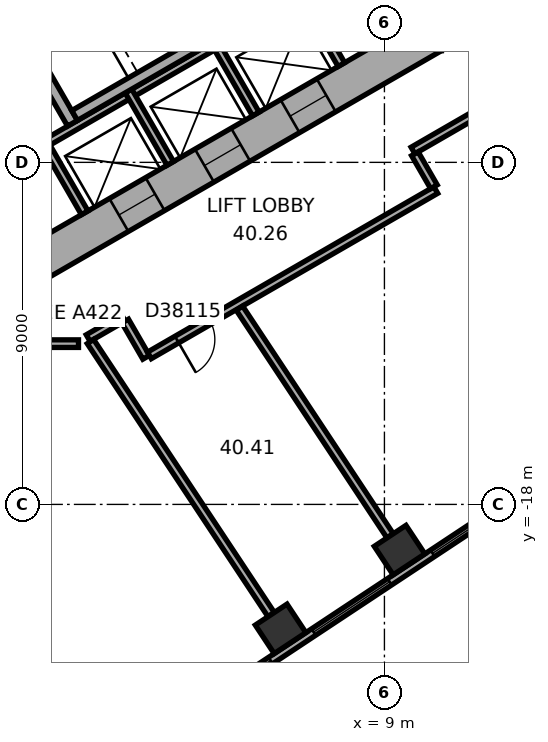
"""IFC4 building model, lengths in metres.
Left out: names, types, materials, properties, quantities, classifications, styles, units other than length and angle.
Written with IfcOpenShell. Run it as: python <this file> out.ifc"""

import sys

from ifc_helpers import new_model, si_unit, direction, frame, frame_2d, origin, origin_2d, place, context, subcontext, project, spatial, rectangle, extrude, element, fill, save


model = new_model("IFC4")
c1 = context("Model", 3, precision=1e-05, world=origin(), true_north=direction((0.0, 1.0)))
c2 = subcontext(c1, "Body", "Model", "MODEL_VIEW")
j1 = project(units=[si_unit("LENGTHUNIT", "METRE"), si_unit("PLANEANGLEUNIT", "RADIAN")], contexts=[c1])
p1 = place(None, origin())
s1 = spatial("IfcSite", under=j1, at=p1, CompositionType="ELEMENT")
p2 = place(p1, origin())
s2 = spatial("IfcBuilding", under=s1, at=p2, CompositionType="ELEMENT")
p3 = place(p2, frame((0.0, 0.0, 165.1)))
s3 = spatial("IfcBuildingStorey", under=s2, at=p3, CompositionType="ELEMENT", Elevation=165.1)
for number, where, z_axis, x_axis in (
    (1, (6.268, -21.274, 0.0), (0.0, 0.0, 1.0), (0.834, 0.552, 0.0)),
    (2, (9.398, -19.202, 0.0), (0.0, 0.0, 1.0), (0.834, 0.552, 0.0)),
):
    element("IfcColumn", number, at=place(p3, frame(where, z_axis=z_axis, x_axis=x_axis)), inside=s3, PredefinedType="COLUMN", context=c2, shape_type="SweptSolid", body=[
        extrude(rectangle(XDim=1.0, YDim=0.9, at=origin_2d()), origin(), (0.0, 0.0, 1.0), 3.7),
    ])
p4 = place(p3, frame((-10.25, -5.629, 0.0), z_axis=(0.0, 0.0, 1.0), x_axis=(0.866022616891, -0.50000482701, 0.0)))
e3 = element("IfcWall", 3, at=p4, inside=s3, PredefinedType="SHEAR", context=c2, shape_type="SweptSolid", body=[
    extrude(rectangle(XDim=12.125, YDim=1.0, at=frame_2d((6.062, 0.0))), origin(), (0.0, 0.0, 1.0), 3.7),
])
p5 = place(p4, frame((6.262, 0.0, 0.0)))
e4 = element("IfcOpeningElement", 4, at=p5, cuts=e3, PredefinedType="OPENING", context=c2, shape_type="SweptSolid", body=[
    extrude(rectangle(XDim=1.5, YDim=2.1, at=frame_2d((0.75, 1.05))), frame((0.0, 0.51, 0.0), z_axis=(0.0, -1.0, 0.0), x_axis=(1.0, 0.0, 0.0)), (0.0, 0.0, 1.0), 1.02),
])
p6 = place(p4, frame((1.712, 0.0, 0.0)))
e5 = element("IfcOpeningElement", 5, at=p6, cuts=e3, PredefinedType="OPENING", context=c2, shape_type="SweptSolid", body=[
    extrude(rectangle(XDim=1.1, YDim=2.1, at=frame_2d((0.55, 1.05))), frame((0.0, 0.51, 0.0), z_axis=(0.0, -1.0, 0.0), x_axis=(1.0, 0.0, 0.0)), (0.0, 0.0, 1.0), 1.02),
])
p7 = place(p4, frame((4.312, 0.0, 0.0)))
e6 = element("IfcOpeningElement", 6, at=p7, cuts=e3, PredefinedType="OPENING", context=c2, shape_type="SweptSolid", body=[
    extrude(rectangle(XDim=1.1, YDim=2.1, at=frame_2d((0.55, 1.05))), frame((0.0, 0.51, 0.0), z_axis=(0.0, -1.0, 0.0), x_axis=(1.0, 0.0, 0.0)), (0.0, 0.0, 1.0), 1.02),
])
p8 = place(p3, frame((-0.25, -11.691, 0.0), z_axis=(0.0, 0.0, 1.0), x_axis=(0.866022616891, 0.50000482701, 0.0)))
e7 = element("IfcWall", 7, at=p8, inside=s3, PredefinedType="SHEAR", context=c2, shape_type="SweptSolid", body=[
    extrude(rectangle(XDim=12.125, YDim=1.0, at=frame_2d((6.062, 0.0))), origin(), (0.0, 0.0, 1.0), 3.7),
])
p9 = place(p8, frame((2.612, 0.0, 0.0)))
e8 = element("IfcOpeningElement", 8, at=p9, cuts=e7, PredefinedType="OPENING", context=c2, shape_type="SweptSolid", body=[
    extrude(rectangle(XDim=1.1, YDim=2.1, at=frame_2d((0.55, 1.05))), frame((0.0, 0.51, 0.0), z_axis=(0.0, -1.0, 0.0), x_axis=(1.0, 0.0, 0.0)), (0.0, 0.0, 1.0), 1.02),
])
p10 = place(p8, frame((5.212, 0.0, 0.0)))
e9 = element("IfcOpeningElement", 9, at=p10, cuts=e7, PredefinedType="OPENING", context=c2, shape_type="SweptSolid", body=[
    extrude(rectangle(XDim=1.1, YDim=2.1, at=frame_2d((0.55, 1.05))), frame((0.0, 0.51, 0.0), z_axis=(0.0, -1.0, 0.0), x_axis=(1.0, 0.0, 0.0)), (0.0, 0.0, 1.0), 1.02),
])
p11 = place(p8, frame((7.812, 0.0, 0.0)))
e10 = element("IfcOpeningElement", 10, at=p11, cuts=e7, PredefinedType="OPENING", context=c2, shape_type="SweptSolid", body=[
    extrude(rectangle(XDim=1.1, YDim=2.1, at=frame_2d((0.55, 1.05))), frame((0.0, 0.51, 0.0), z_axis=(0.0, -1.0, 0.0), x_axis=(1.0, 0.0, 0.0)), (0.0, 0.0, 1.0), 1.02),
])
p12 = place(p3, frame((2.911, -24.156, 0.0), z_axis=(0.0, 0.0, 1.0), x_axis=(0.833882163564, 0.551942512668, 0.0)))
e11 = element("IfcWall", 11, at=p12, inside=s3, PredefinedType="STANDARD", context=c2, shape_type="SweptSolid", body=[
    extrude(rectangle(XDim=20.044, YDim=0.2, at=frame_2d((10.022, 0.0))), origin(), (0.0, 0.0, 1.0), 3.7),
])
p13 = place(p12, frame((1.313, 0.0, 0.9)))
e12 = element("IfcOpeningElement", 12, at=p13, cuts=e11, PredefinedType="OPENING", context=c2, shape_type="SweptSolid", body=[
    extrude(rectangle(XDim=2.4, YDim=2.0, at=frame_2d((1.2, 1.0))), frame((0.0, 0.11, 0.0), z_axis=(0.0, -1.0, 0.0), x_axis=(1.0, 0.0, 0.0)), (0.0, 0.0, 1.0), 0.22),
])
p14 = place(p12, frame((5.067, 0.0, 0.9)))
e13 = element("IfcOpeningElement", 13, at=p14, cuts=e11, PredefinedType="OPENING", context=c2, shape_type="SweptSolid", body=[
    extrude(rectangle(XDim=2.4, YDim=2.0, at=frame_2d((1.2, 1.0))), frame((0.0, 0.11, 0.0), z_axis=(0.0, -1.0, 0.0), x_axis=(1.0, 0.0, 0.0)), (0.0, 0.0, 1.0), 0.22),
])
p15 = place(p12, frame((8.821, 0.0, 0.9)))
e14 = element("IfcOpeningElement", 14, at=p15, cuts=e11, PredefinedType="OPENING", context=c2, shape_type="SweptSolid", body=[
    extrude(rectangle(XDim=2.4, YDim=2.0, at=frame_2d((1.2, 1.0))), frame((0.0, 0.11, 0.0), z_axis=(0.0, -1.0, 0.0), x_axis=(1.0, 0.0, 0.0)), (0.0, 0.0, 1.0), 0.22),
])
p16 = place(p12, frame((12.575, 0.0, 0.9)))
e15 = element("IfcOpeningElement", 15, at=p16, cuts=e11, PredefinedType="OPENING", context=c2, shape_type="SweptSolid", body=[
    extrude(rectangle(XDim=2.4, YDim=2.0, at=frame_2d((1.2, 1.0))), frame((0.0, 0.11, 0.0), z_axis=(0.0, -1.0, 0.0), x_axis=(1.0, 0.0, 0.0)), (0.0, 0.0, 1.0), 0.22),
])
p17 = place(p12, frame((16.329, 0.0, 0.9)))
e16 = element("IfcOpeningElement", 16, at=p17, cuts=e11, PredefinedType="OPENING", context=c2, shape_type="SweptSolid", body=[
    extrude(rectangle(XDim=2.4, YDim=2.0, at=frame_2d((1.2, 1.0))), frame((0.0, 0.11, 0.0), z_axis=(0.0, -1.0, 0.0), x_axis=(1.0, 0.0, 0.0)), (0.0, 0.0, 1.0), 0.22),
])
p18 = place(p3, frame((-0.024, -8.559, 0.0), z_axis=(0.0, 0.0, 1.0), x_axis=(0.866026010844, 0.49999894854, 0.0)))
e17 = element("IfcWall", 17, at=p18, inside=s3, PredefinedType="PARTITIONING", context=c2, shape_type="SweptSolid", body=[
    extrude(rectangle(XDim=8.0, YDim=0.2, at=frame_2d((4.0, 0.0))), origin(), (0.0, 0.0, 1.0), 3.42),
])
for number, where, z_axis, x_axis in (
    (18, (0.013, -8.422, 0.0), (0.0, 0.0, 1.0), (0.5, -0.866, 0.0)),
    (19, (2.264, -7.122, 0.0), (0.0, 0.0, 1.0), (0.5, -0.866, 0.0)),
    (20, (4.516, -5.822, 0.0), (0.0, 0.0, 1.0), (0.5, -0.866, 0.0)),
    (21, (6.768, -4.522, 0.0), (0.0, 0.0, 1.0), (0.5, -0.866, 0.0)),
):
    element("IfcWall", number, at=place(p3, frame(where, z_axis=z_axis, x_axis=x_axis)), inside=s3, PredefinedType="PARTITIONING", context=c2, shape_type="SweptSolid", body=[
        extrude(rectangle(XDim=2.2, YDim=0.2, at=frame_2d((1.1, 0.0))), origin(), (0.0, 0.0, 1.0), 3.42),
    ])
p19 = place(p3, frame((-1.558, -3.902, 0.0), z_axis=(0.0, 0.0, 1.0), x_axis=(0.499977259774, -0.866038532462, 0.0)))
e22 = element("IfcWall", 22, at=p19, inside=s3, PredefinedType="SHEAR", context=c2, shape_type="SweptSolid", body=[
    extrude(rectangle(XDim=4.7, YDim=0.3, at=frame_2d((2.35, 0.0))), origin(), (0.0, 0.0, 1.0), 3.42),
])
p20 = place(p19, frame((0.8, 0.0, 0.0)))
e23 = element("IfcOpeningElement", 23, at=p20, cuts=e22, PredefinedType="OPENING", context=c2, shape_type="SweptSolid", body=[
    extrude(rectangle(XDim=1.2, YDim=2.1, at=frame_2d((0.6, 1.05))), frame((0.0, 0.16, 0.0), z_axis=(0.0, -1.0, 0.0), x_axis=(1.0, 0.0, 0.0)), (0.0, 0.0, 1.0), 0.32),
])
p21 = place(p3, frame((0.847, -7.767, 0.0), z_axis=(0.0, 0.0, 1.0), x_axis=(0.866027801685, 0.499995846692, 0.0)))
e24 = element("IfcWall", 24, at=p21, inside=s3, PredefinedType="SHEAR", context=c2, shape_type="SweptSolid", body=[
    extrude(rectangle(XDim=7.06, YDim=0.3, at=frame_2d((3.53, 0.0))), origin(), (0.0, 0.0, 1.0), 3.42),
])
p22 = place(p3, frame((-0.95, -13.77, 0.0), z_axis=(0.0, 0.0, 1.0), x_axis=(1.0, 0.0, 0.0)))
e25 = element("IfcWall", 25, at=p22, inside=s3, PredefinedType="PARTITIONING", context=c2, shape_type="SweptSolid", body=[
    extrude(rectangle(XDim=1.9, YDim=0.2, at=frame_2d((0.95, 0.0))), origin(), (0.0, 0.0, 1.0), 3.42),
])
p23 = place(p3, frame((1.204, -13.623, 0.0), z_axis=(0.0, 0.0, 1.0), x_axis=(0.866040989419, 0.499973003918, 0.0)))
e26 = element("IfcWall", 26, at=p23, inside=s3, PredefinedType="PARTITIONING", context=c2, shape_type="SweptSolid", body=[
    extrude(rectangle(XDim=1.068, YDim=0.2, at=frame_2d((0.534, 0.0))), origin(), (0.0, 0.0, 1.0), 3.42),
])
p24 = place(p3, frame((2.179, -13.176, 0.0), z_axis=(0.0, 0.0, 1.0), x_axis=(0.499978356969, -0.866037899034, 0.0)))
e27 = element("IfcWall", 27, at=p24, inside=s3, PredefinedType="PARTITIONING", context=c2, shape_type="SweptSolid", body=[
    extrude(rectangle(XDim=1.101, YDim=0.2, at=frame_2d((0.551, 0.0))), origin(), (0.0, 0.0, 1.0), 3.42),
])
p25 = place(p3, frame((2.816, -14.079, 0.0), z_axis=(0.0, 0.0, 1.0), x_axis=(0.866021128829, 0.500007404367, 0.0)))
e28 = element("IfcWall", 28, at=p25, inside=s3, PredefinedType="PARTITIONING", context=c2, shape_type="SweptSolid", body=[
    extrude(rectangle(XDim=8.702, YDim=0.2, at=frame_2d((4.351, 0.0))), origin(), (0.0, 0.0, 1.0), 3.42),
])
p26 = place(p25, frame((0.833, 0.0, 0.0)))
e29 = element("IfcOpeningElement", 29, at=p26, cuts=e28, PredefinedType="OPENING", context=c2, shape_type="SweptSolid", body=[
    extrude(rectangle(XDim=1.0, YDim=2.1, at=frame_2d((0.5, 1.05))), frame((0.0, 0.11, 0.0), z_axis=(0.0, -1.0, 0.0), x_axis=(1.0, 0.0, 0.0)), (0.0, 0.0, 1.0), 0.22),
])
p27 = place(p3, frame((6.02, -20.899, 0.0), z_axis=(0.0, 0.0, 1.0), x_axis=(-0.551943990108, 0.833881185651, 0.0)))
e30 = element("IfcWall", 30, at=p27, inside=s3, PredefinedType="PARTITIONING", context=c2, shape_type="SweptSolid", body=[
    extrude(rectangle(XDim=8.615, YDim=0.2, at=frame_2d((4.308, 0.0))), origin(), (0.0, 0.0, 1.0), 3.42),
])
p28 = place(p3, frame((9.15, -18.827, 0.0), z_axis=(0.0, 0.0, 1.0), x_axis=(-0.551928083938, 0.83389171369, 0.0)))
e31 = element("IfcWall", 31, at=p28, inside=s3, PredefinedType="PARTITIONING", context=c2, shape_type="SweptSolid", body=[
    extrude(rectangle(XDim=7.182, YDim=0.2, at=frame_2d((3.591, 0.0))), origin(), (0.0, 0.0, 1.0), 2.87),
])
p29 = place(p3, frame((9.752, -8.688, 0.0), z_axis=(0.0, 0.0, 1.0), x_axis=(0.865974105138, 0.500088841337, 0.0)))
e32 = element("IfcWall", 32, at=p29, inside=s3, PredefinedType="PARTITIONING", context=c2, shape_type="SweptSolid", body=[
    extrude(rectangle(XDim=1.961, YDim=0.2, at=frame_2d((0.98, 0.0))), origin(), (0.0, 0.0, 1.0), 3.42),
])
p30 = place(p3, frame((10.302, -9.642, 0.0), z_axis=(0.0, 0.0, 1.0), x_axis=(-0.500074377092, 0.865982457891, 0.0)))
e33 = element("IfcWall", 33, at=p30, inside=s3, PredefinedType="PARTITIONING", context=c2, shape_type="SweptSolid", body=[
    extrude(rectangle(XDim=1.001, YDim=0.2, at=frame_2d((0.5, 0.0))), origin(), (0.0, 0.0, 1.0), 3.42),
])
p31 = place(p13, origin())
e34 = element("IfcWindow", 34, at=p31, inside=s3, PartitioningType="SINGLE_PANEL", PredefinedType="WINDOW", context=c2, shape_type="SweptSolid", body=[
    extrude(rectangle(XDim=2.4, YDim=2.0, at=frame_2d((1.2, 1.0))), frame((0.0, 0.03, 0.0), z_axis=(0.0, -1.0, 0.0), x_axis=(1.0, 0.0, 0.0)), (0.0, 0.0, 1.0), 0.06),
])
fill(e12, e34)
p32 = place(p14, origin())
e35 = element("IfcWindow", 35, at=p32, inside=s3, PartitioningType="SINGLE_PANEL", PredefinedType="WINDOW", context=c2, shape_type="SweptSolid", body=[
    extrude(rectangle(XDim=2.4, YDim=2.0, at=frame_2d((1.2, 1.0))), frame((0.0, 0.03, 0.0), z_axis=(0.0, -1.0, 0.0), x_axis=(1.0, 0.0, 0.0)), (0.0, 0.0, 1.0), 0.06),
])
fill(e13, e35)
p33 = place(p15, origin())
e36 = element("IfcWindow", 36, at=p33, inside=s3, PartitioningType="SINGLE_PANEL", PredefinedType="WINDOW", context=c2, shape_type="SweptSolid", body=[
    extrude(rectangle(XDim=2.4, YDim=2.0, at=frame_2d((1.2, 1.0))), frame((0.0, 0.03, 0.0), z_axis=(0.0, -1.0, 0.0), x_axis=(1.0, 0.0, 0.0)), (0.0, 0.0, 1.0), 0.06),
])
fill(e14, e36)
p34 = place(p9, origin())
e37 = element("IfcDoor", 37, at=p34, inside=s3, OperationType="DOUBLE_DOOR_SLIDING", PredefinedType="DOOR", context=c2, shape_type="SweptSolid", body=[
    extrude(rectangle(XDim=1.1, YDim=2.1, at=frame_2d((0.55, 1.05))), frame((0.0, 0.025, 0.0), z_axis=(0.0, -1.0, 0.0), x_axis=(1.0, 0.0, 0.0)), (0.0, 0.0, 1.0), 0.05),
])
fill(e8, e37)
p35 = place(p10, origin())
e38 = element("IfcDoor", 38, at=p35, inside=s3, OperationType="DOUBLE_DOOR_SLIDING", PredefinedType="DOOR", context=c2, shape_type="SweptSolid", body=[
    extrude(rectangle(XDim=1.1, YDim=2.1, at=frame_2d((0.55, 1.05))), frame((0.0, 0.025, 0.0), z_axis=(0.0, -1.0, 0.0), x_axis=(1.0, 0.0, 0.0)), (0.0, 0.0, 1.0), 0.05),
])
fill(e9, e38)
p36 = place(p11, origin())
e39 = element("IfcDoor", 39, at=p36, inside=s3, OperationType="DOUBLE_DOOR_SLIDING", PredefinedType="DOOR", context=c2, shape_type="SweptSolid", body=[
    extrude(rectangle(XDim=1.1, YDim=2.1, at=frame_2d((0.55, 1.05))), frame((0.0, 0.025, 0.0), z_axis=(0.0, -1.0, 0.0), x_axis=(1.0, 0.0, 0.0)), (0.0, 0.0, 1.0), 0.05),
])
fill(e10, e39)
p37 = place(p26, origin())
e40 = element("IfcDoor", 40, at=p37, inside=s3, OperationType="SINGLE_SWING_LEFT", PredefinedType="DOOR", context=c2, shape_type="SweptSolid", body=[
    extrude(rectangle(XDim=1.0, YDim=2.1, at=frame_2d((0.5, 1.05))), frame((0.0, 0.025, 0.0), z_axis=(0.0, -1.0, 0.0), x_axis=(1.0, 0.0, 0.0)), (0.0, 0.0, 1.0), 0.05),
])
fill(e29, e40)
save(model, sys.argv[1])
